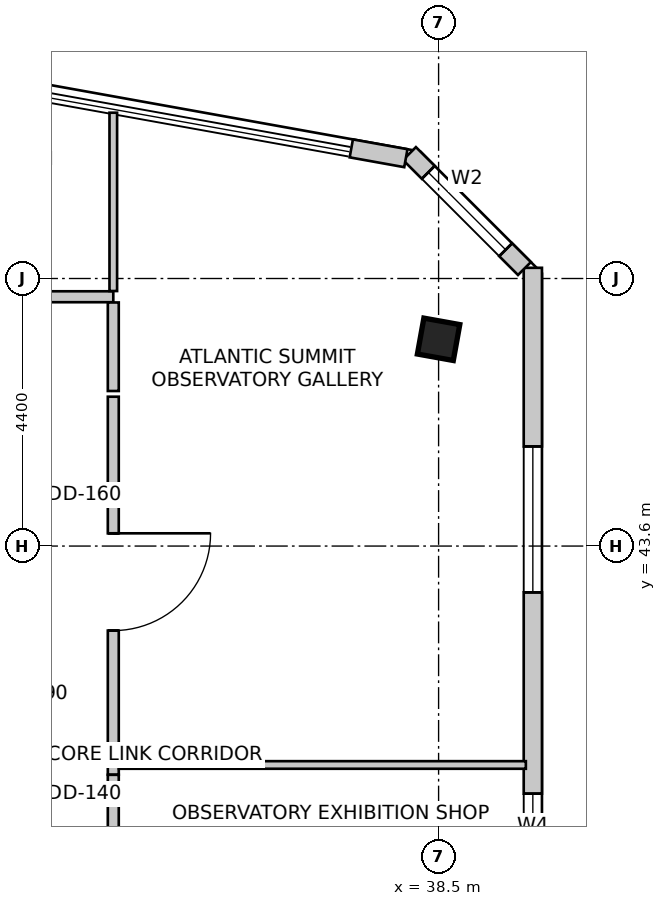
"""IFC4 building model, lengths in metres.
Left out: names, types, materials, properties, quantities, classifications, styles, units other than length and angle.
Written with IfcOpenShell. Run it as: python <this file> out.ifc"""

import sys

from ifc_helpers import new_model, si_unit, direction, frame, frame_2d, origin, origin_2d, place, context, subcontext, project, spatial, rectangle, extrude, source, transform, mapped, element, fill, save


model = new_model("IFC4")
c1 = context("Model", 3, precision=1e-05, world=origin(), true_north=direction((0.0, 1.0)))
c2 = subcontext(c1, "Body", "Model", "MODEL_VIEW")
j1 = project(units=[si_unit("LENGTHUNIT", "METRE"), si_unit("PLANEANGLEUNIT", "RADIAN")], contexts=[c1])
p1 = place(None, origin())
s1 = spatial("IfcSite", under=j1, at=p1, CompositionType="ELEMENT")
p2 = place(p1, origin())
s2 = spatial("IfcBuilding", under=s1, at=p2, CompositionType="ELEMENT")
p3 = place(p2, frame((0.0, 0.0, 292.5)))
s3 = spatial("IfcBuildingStorey", under=s2, at=p3, CompositionType="ELEMENT", Elevation=292.5)
m1 = source(origin(), c2, "Body", "SweptSolid", [
    extrude(rectangle(XDim=0.6, YDim=0.6, at=origin_2d()), origin(), (0.0, 0.0, 1.0), 4.0),
])
p4 = place(p3, frame((38.5, 47.0, 0.0), z_axis=(0.0, 0.0, 1.0), x_axis=(0.984195607969, -0.17708474032, 0.0)))
e1 = element("IfcColumn", 1, at=p4, inside=s3, PredefinedType="COLUMN", context=c2, shape_type="MappedRepresentation", body=[
    mapped(m1, transform((0.0, 0.0, 0.0), scale=1.0)),
])
p5 = place(p3, frame((40.05, 36.857, 0.0), z_axis=(0.0, 0.0, 1.0), x_axis=(0.0, 1.0, 0.0)))
e2 = element("IfcWall", 2, at=p5, inside=s3, PredefinedType="SOLIDWALL", context=c2, shape_type="SweptSolid", body=[
    extrude(rectangle(XDim=11.318, YDim=0.3, at=frame_2d((5.659, 0.0))), origin(), (0.0, 0.0, 1.0), 3.75),
])
m2 = source(origin(), c2, "Body", "SweptSolid", [
    extrude(rectangle(XDim=2.1, YDim=2.0, at=frame_2d((1.05, 1.0))), frame((0.0, 0.16, 0.0), z_axis=(0.0, -1.0, 0.0), x_axis=(1.0, 0.0, 0.0)), (0.0, 0.0, 1.0), 0.32),
])
p6 = place(p5, frame((0.571, 0.0, 0.85)))
e3 = element("IfcOpeningElement", 3, at=p6, cuts=e2, PredefinedType="OPENING", context=c2, shape_type="MappedRepresentation", body=[
    mapped(m2, transform((0.0, 0.0, 0.0), scale=1.0)),
])
m3 = source(origin(), c2, "Body", "SweptSolid", [
    extrude(rectangle(XDim=2.4, YDim=2.2, at=frame_2d((1.2, 1.1))), frame((0.0, 0.16, 0.0), z_axis=(0.0, -1.0, 0.0), x_axis=(1.0, 0.0, 0.0)), (0.0, 0.0, 1.0), 0.32),
])
p7 = place(p5, frame((5.981, 0.0, 0.85)))
e4 = element("IfcOpeningElement", 4, at=p7, cuts=e2, PredefinedType="OPENING", context=c2, shape_type="MappedRepresentation", body=[
    mapped(m3, transform((0.0, 0.0, 0.0), scale=1.0)),
])
p8 = place(p3, frame((39.912, 48.164, 0.0), z_axis=(0.0, 0.0, 1.0), x_axis=(-0.70715242601, 0.707061133417, 0.0)))
e5 = element("IfcWall", 5, at=p8, inside=s3, PredefinedType="SOLIDWALL", context=c2, shape_type="SweptSolid", body=[
    extrude(rectangle(XDim=2.674, YDim=0.3, at=frame_2d((1.337, 0.0))), origin(), (0.0, 0.0, 1.0), 3.75),
])
m4 = source(origin(), c2, "Body", "SweptSolid", [
    extrude(rectangle(XDim=1.8, YDim=2.1, at=frame_2d((0.9, 1.05))), frame((0.0, 0.16, 0.0), z_axis=(0.0, -1.0, 0.0), x_axis=(1.0, 0.0, 0.0)), (0.0, 0.0, 1.0), 0.32),
])
p9 = place(p8, frame((0.437, 0.0, 0.85)))
e6 = element("IfcOpeningElement", 6, at=p9, cuts=e5, PredefinedType="OPENING", context=c2, shape_type="MappedRepresentation", body=[
    mapped(m4, transform((0.0, 0.0, 0.0), scale=1.0)),
])
p10 = place(p3, frame((37.962, 49.979, 0.0), z_axis=(0.0, 0.0, 1.0), x_axis=(-0.984215051171, 0.176976645491, 0.0)))
e7 = element("IfcWall", 7, at=p10, inside=s3, PredefinedType="SOLIDWALL", context=c2, shape_type="SweptSolid", body=[
    extrude(rectangle(XDim=0.912, YDim=0.3, at=frame_2d((0.456, 0.0))), origin(), (0.0, 0.0, 1.0), 3.75),
])
p11 = place(p3, frame((28.362, 47.7, 0.0), z_axis=(0.0, 0.0, 1.0), x_axis=(1.0, 0.0, 0.0)))
e8 = element("IfcWall", 8, at=p11, inside=s3, PredefinedType="PARTITIONING", context=c2, shape_type="SweptSolid", body=[
    extrude(rectangle(XDim=4.788, YDim=0.18, at=frame_2d((2.394, 0.0))), origin(), (0.0, 0.0, 1.0), 3.188),
])
m5 = source(origin(), c2, "Body", "SweptSolid", [
    extrude(rectangle(XDim=0.85, YDim=2.15, at=frame_2d((0.425, 1.075))), frame((0.0, 0.1, 0.0), z_axis=(0.0, -1.0, 0.0), x_axis=(1.0, 0.0, 0.0)), (0.0, 0.0, 1.0), 0.2),
])
p12 = place(p11, frame((0.401, 0.0, 0.0)))
e9 = element("IfcOpeningElement", 9, at=p12, cuts=e8, PredefinedType="OPENING", context=c2, shape_type="MappedRepresentation", body=[
    mapped(m5, transform((0.0, 0.0, 0.0), scale=1.0)),
])
p13 = place(p3, frame((33.15, 47.606, 0.0), z_axis=(0.0, 0.0, 1.0), x_axis=(0.0, -1.0, 0.0)))
e10 = element("IfcWall", 10, at=p13, inside=s3, PredefinedType="PARTITIONING", context=c2, shape_type="SweptSolid", body=[
    extrude(rectangle(XDim=1.456, YDim=0.18, at=frame_2d((0.728, 0.0))), origin(), (0.0, 0.0, 1.0), 3.75),
])
p14 = place(p3, frame((33.15, 46.056, 0.0), z_axis=(0.0, 0.0, 1.0), x_axis=(0.0, -1.0, 0.0)))
e11 = element("IfcWall", 11, at=p14, inside=s3, PredefinedType="PARTITIONING", context=c2, shape_type="SweptSolid", body=[
    extrude(rectangle(XDim=6.216, YDim=0.18, at=frame_2d((3.108, 0.0))), origin(), (0.0, 0.0, 1.0), 3.188),
])
m6 = source(origin(), c2, "Body", "SweptSolid", [
    extrude(rectangle(XDim=1.6, YDim=2.15, at=frame_2d((0.8, 1.075))), frame((0.0, 0.1, 0.0), z_axis=(0.0, -1.0, 0.0), x_axis=(1.0, 0.0, 0.0)), (0.0, 0.0, 1.0), 0.2),
])
p15 = place(p14, frame((2.247, 0.0, 0.0)))
e12 = element("IfcOpeningElement", 12, at=p15, cuts=e11, PredefinedType="OPENING", context=c2, shape_type="MappedRepresentation", body=[
    mapped(m6, transform((0.0, 0.0, 0.0), scale=1.0)),
])
p16 = place(p3, frame((33.15, 39.838, 0.0), z_axis=(0.0, 0.0, 1.0), x_axis=(0.0, -1.0, 0.0)))
e13 = element("IfcWall", 13, at=p16, inside=s3, PredefinedType="PARTITIONING", context=c2, shape_type="SweptSolid", body=[
    extrude(rectangle(XDim=3.638, YDim=0.18, at=frame_2d((1.819, 0.0))), origin(), (0.0, 0.0, 1.0), 3.75),
])
m7 = source(origin(), c2, "Body", "SweptSolid", [
    extrude(rectangle(XDim=1.4, YDim=2.15, at=frame_2d((0.7, 1.075))), frame((0.0, 0.1, 0.0), z_axis=(0.0, -1.0, 0.0), x_axis=(1.0, 0.0, 0.0)), (0.0, 0.0, 1.0), 0.2),
])
p17 = place(p16, frame((1.054, 0.0, 0.0)))
e14 = element("IfcOpeningElement", 14, at=p17, cuts=e13, PredefinedType="OPENING", context=c2, shape_type="MappedRepresentation", body=[
    mapped(m7, transform((0.0, 0.0, 0.0), scale=1.0)),
])
p18 = place(p3, frame((33.15, 50.727, 0.0), z_axis=(0.0, 0.0, 1.0), x_axis=(0.0, -1.0, 0.0)))
e15 = element("IfcWall", 15, at=p18, inside=s3, PredefinedType="PARTITIONING", context=c2, shape_type="SweptSolid", body=[
    extrude(rectangle(XDim=2.933, YDim=0.125, at=frame_2d((1.466, 0.0))), origin(), (0.0, 0.0, 1.0), 3.042),
])
p19 = place(p3, frame((39.935, 40.0, 0.0), z_axis=(0.0, 0.0, 1.0), x_axis=(-1.0, 0.0, 0.0)))
e16 = element("IfcWall", 16, at=p19, inside=s3, PredefinedType="PARTITIONING", context=c2, shape_type="SweptSolid", body=[
    extrude(rectangle(XDim=6.691, YDim=0.125, at=frame_2d((3.346, 0.0))), origin(), (0.0, 0.0, 1.0), 3.75),
])
m8 = source(origin(), c2, "Body", "SweptSolid", [
    extrude(rectangle(XDim=2.1, YDim=2.0, at=frame_2d((1.05, 1.0))), frame((0.0, -0.015, 0.0), z_axis=(0.0, -1.0, 0.0), x_axis=(1.0, 0.0, 0.0)), (0.0, 0.0, 1.0), 0.06),
])
p20 = place(p6, origin())
e17 = element("IfcWindow", 17, at=p20, inside=s3, PartitioningType="SINGLE_PANEL", PredefinedType="WINDOW", context=c2, shape_type="MappedRepresentation", body=[
    mapped(m8, transform((0.0, 0.0, 0.0), scale=1.0)),
])
fill(e3, e17)
m9 = source(origin(), c2, "Body", "SweptSolid", [
    extrude(rectangle(XDim=2.4, YDim=2.2, at=frame_2d((1.2, 1.1))), frame((0.0, -0.015, 0.0), z_axis=(0.0, -1.0, 0.0), x_axis=(1.0, 0.0, 0.0)), (0.0, 0.0, 1.0), 0.06),
])
p21 = place(p7, origin())
e18 = element("IfcWindow", 18, at=p21, inside=s3, PartitioningType="SINGLE_PANEL", PredefinedType="WINDOW", context=c2, shape_type="MappedRepresentation", body=[
    mapped(m9, transform((0.0, 0.0, 0.0), scale=1.0)),
])
fill(e4, e18)
m10 = source(origin(), c2, "Body", "SweptSolid", [
    extrude(rectangle(XDim=1.8, YDim=2.1, at=frame_2d((0.9, 1.05))), frame((0.0, -0.015, 0.0), z_axis=(0.0, -1.0, 0.0), x_axis=(1.0, 0.0, 0.0)), (0.0, 0.0, 1.0), 0.06),
])
p22 = place(p9, origin())
e19 = element("IfcWindow", 19, at=p22, inside=s3, PartitioningType="SINGLE_PANEL", PredefinedType="WINDOW", context=c2, shape_type="MappedRepresentation", body=[
    mapped(m10, transform((0.0, 0.0, 0.0), scale=1.0)),
])
fill(e6, e19)
m11 = source(origin(), c2, "Body", "SweptSolid", [
    extrude(rectangle(XDim=1.6, YDim=2.15, at=frame_2d((0.8, 1.075))), frame((0.0, 0.025, 0.0), z_axis=(0.0, -1.0, 0.0), x_axis=(1.0, 0.0, 0.0)), (0.0, 0.0, 1.0), 0.05),
])
p23 = place(p15, origin())
e20 = element("IfcDoor", 20, at=p23, inside=s3, OperationType="SINGLE_SWING_LEFT", PredefinedType="DOOR", context=c2, shape_type="MappedRepresentation", body=[
    mapped(m11, transform((0.0, 0.0, 0.0), scale=1.0)),
])
fill(e12, e20)
save(model, sys.argv[1])
